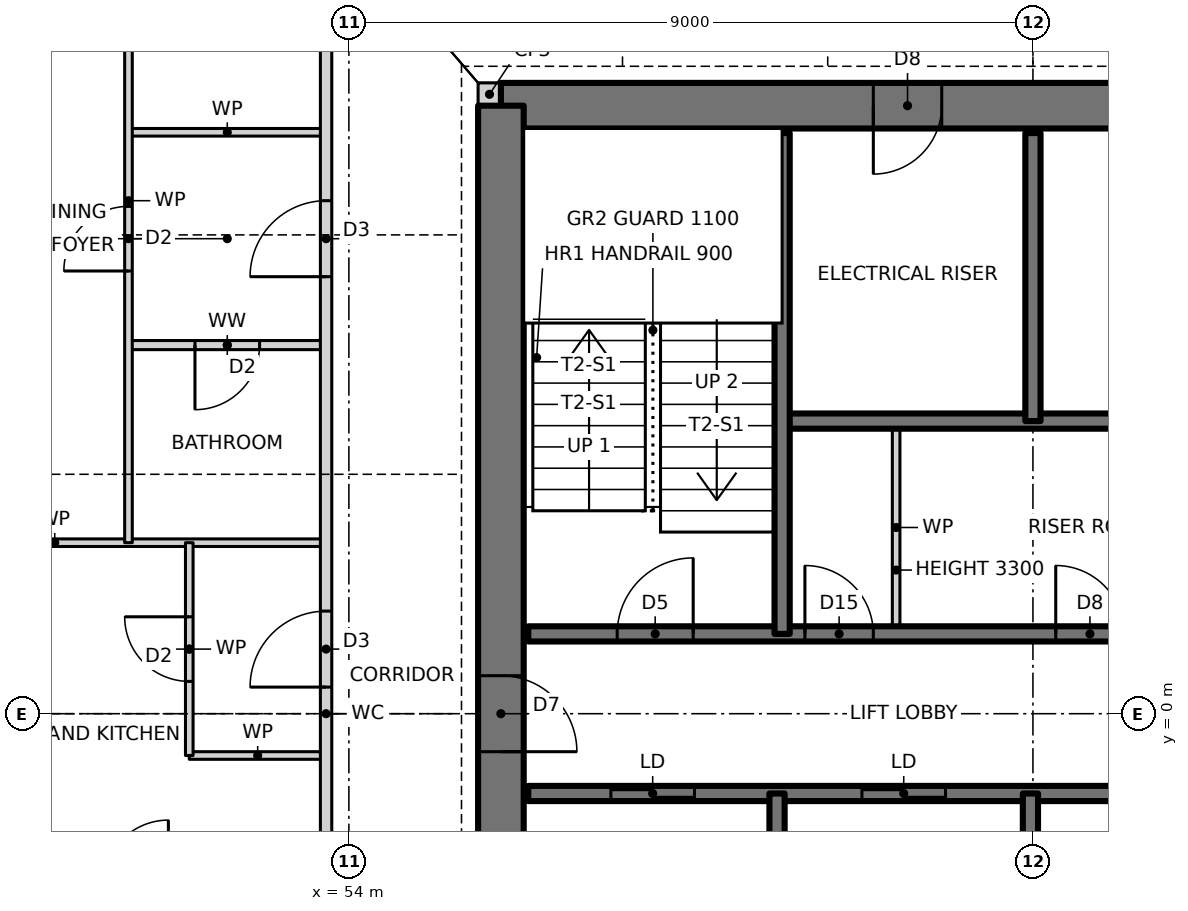
"""IFC4 building model, lengths in metres.
Left out: names, types, materials, properties, quantities, classifications, styles, units other than length and angle.
Written with IfcOpenShell. Run it as: python <this file> out.ifc"""

import sys

from ifc_helpers import new_model, si_unit, direction, frame, frame_2d, origin, place, context, subcontext, project, spatial, rectangle, extrude, element, fill, save


model = new_model("IFC4")
c1 = context("Model", 3, precision=1e-05, world=origin(), true_north=direction((0.0, 1.0)))
c2 = subcontext(c1, "Body", "Model", "MODEL_VIEW")
j1 = project(units=[si_unit("LENGTHUNIT", "METRE"), si_unit("PLANEANGLEUNIT", "RADIAN")], contexts=[c1])
p1 = place(None, origin())
s1 = spatial("IfcSite", under=j1, at=p1, CompositionType="ELEMENT")
p2 = place(p1, origin())
s2 = spatial("IfcBuilding", under=s1, at=p2, CompositionType="ELEMENT")
p3 = place(p2, frame((0.0, 0.0, 71.0)))
s3 = spatial("IfcBuildingStorey", under=s2, at=p3, CompositionType="ELEMENT", Elevation=71.0)
p4 = place(p3, frame((55.7, 8.15, 0.0), z_axis=(0.0, 0.0, 1.0), x_axis=(1.0, 0.0, 0.0)))
e1 = element("IfcWall", 1, at=p4, inside=s3, PredefinedType="SOLIDWALL", context=c2, shape_type="SweptSolid", body=[
    extrude(rectangle(XDim=0.3, YDim=0.3, at=frame_2d((0.15, 0.0))), origin(), (0.0, 0.0, 1.0), 3.5),
])
p5 = place(p3, frame((70.0, 8.0, 0.0), z_axis=(0.0, 0.0, 1.0), x_axis=(-1.0, 0.0, 0.0)))
e2 = element("IfcWall", 2, at=p5, inside=s3, PredefinedType="SHEAR", context=c2, shape_type="SweptSolid", body=[
    extrude(rectangle(XDim=14.0, YDim=0.6, at=frame_2d((7.0, 0.0))), origin(), (0.0, 0.0, 1.0), 3.5),
])
p6 = place(p5, frame((8.2, 0.0, 0.0)))
e3 = element("IfcOpeningElement", 3, at=p6, cuts=e2, PredefinedType="OPENING", context=c2, shape_type="SweptSolid", body=[
    extrude(rectangle(XDim=0.9, YDim=2.1, at=frame_2d((0.45, 1.05))), frame((0.0, 0.31, 0.0), z_axis=(0.0, -1.0, 0.0), x_axis=(1.0, 0.0, 0.0)), (0.0, 0.0, 1.0), 0.62),
])
p7 = place(p5, frame((3.2, 0.0, 0.0)))
e4 = element("IfcOpeningElement", 4, at=p7, cuts=e2, PredefinedType="OPENING", context=c2, shape_type="SweptSolid", body=[
    extrude(rectangle(XDim=0.9, YDim=2.1, at=frame_2d((0.45, 1.05))), frame((0.0, 0.31, 0.0), z_axis=(0.0, -1.0, 0.0), x_axis=(1.0, 0.0, 0.0)), (0.0, 0.0, 1.0), 0.62),
])
p8 = place(p3, frame((56.0, 8.0, 0.0), z_axis=(0.0, 0.0, 1.0), x_axis=(0.0, -1.0, 0.0)))
e5 = element("IfcWall", 5, at=p8, inside=s3, PredefinedType="SHEAR", context=c2, shape_type="SweptSolid", body=[
    extrude(rectangle(XDim=16.0, YDim=0.6, at=frame_2d((8.0, 0.0))), origin(), (0.0, 0.0, 1.0), 3.5),
])
p9 = place(p8, frame((7.5, 0.0, 0.0)))
e6 = element("IfcOpeningElement", 6, at=p9, cuts=e5, PredefinedType="OPENING", context=c2, shape_type="SweptSolid", body=[
    extrude(rectangle(XDim=1.0, YDim=2.1, at=frame_2d((0.5, 1.05))), frame((0.0, 0.31, 0.0), z_axis=(0.0, -1.0, 0.0), x_axis=(1.0, 0.0, 0.0)), (0.0, 0.0, 1.0), 0.62),
])
p10 = place(p3, frame((56.36, -1.05, 0.0), z_axis=(0.0, 0.0, 1.0), x_axis=(1.0, 0.0, 0.0)))
e7 = element("IfcWall", 7, at=p10, inside=s3, PredefinedType="SOLIDWALL", context=c2, shape_type="SweptSolid", body=[
    extrude(rectangle(XDim=13.28, YDim=0.2, at=frame_2d((6.64, 0.0))), origin(), (0.0, 0.0, 1.0), 3.5),
])
p11 = place(p10, frame((11.11, 0.0, 0.0)))
e8 = element("IfcOpeningElement", 8, at=p11, cuts=e7, PredefinedType="OPENING", context=c2, shape_type="SweptSolid", body=[
    extrude(rectangle(XDim=1.0, YDim=2.1, at=frame_2d((0.5, 1.05))), frame((0.0, 0.11, 0.0), z_axis=(0.0, -1.0, 0.0), x_axis=(1.0, 0.0, 0.0)), (0.0, 0.0, 1.0), 0.22),
])
p12 = place(p10, frame((1.087, 0.0, 0.0)))
e9 = element("IfcOpeningElement", 9, at=p12, cuts=e7, PredefinedType="OPENING", context=c2, shape_type="SweptSolid", body=[
    extrude(rectangle(XDim=1.1, YDim=2.1, at=frame_2d((0.55, 1.05))), frame((0.0, 0.11, 0.0), z_axis=(0.0, -1.0, 0.0), x_axis=(1.0, 0.0, 0.0)), (0.0, 0.0, 1.0), 0.22),
])
p13 = place(p10, frame((4.39, 0.0, 0.0)))
e10 = element("IfcOpeningElement", 10, at=p13, cuts=e7, PredefinedType="OPENING", context=c2, shape_type="SweptSolid", body=[
    extrude(rectangle(XDim=1.1, YDim=2.1, at=frame_2d((0.55, 1.05))), frame((0.0, 0.11, 0.0), z_axis=(0.0, -1.0, 0.0), x_axis=(1.0, 0.0, 0.0)), (0.0, 0.0, 1.0), 0.22),
])
p14 = place(p10, frame((7.724, 0.0, 0.0)))
e11 = element("IfcOpeningElement", 11, at=p14, cuts=e7, PredefinedType="OPENING", context=c2, shape_type="SweptSolid", body=[
    extrude(rectangle(XDim=1.1, YDim=2.1, at=frame_2d((0.55, 1.05))), frame((0.0, 0.11, 0.0), z_axis=(0.0, -1.0, 0.0), x_axis=(1.0, 0.0, 0.0)), (0.0, 0.0, 1.0), 0.22),
])
p15 = place(p3, frame((51.9, -0.55, 0.0), z_axis=(0.0, 0.0, 1.0), x_axis=(1.0, 0.0, 0.0)))
e12 = element("IfcWall", 12, at=p15, inside=s3, PredefinedType="PARTITIONING", context=c2, shape_type="SweptSolid", body=[
    extrude(rectangle(XDim=1.8, YDim=0.1, at=frame_2d((0.9, 0.0))), origin(), (0.0, 0.0, 1.0), 3.2),
])
p16 = place(p3, frame((56.36, 1.05, 0.0), z_axis=(0.0, 0.0, 1.0), x_axis=(1.0, 0.0, 0.0)))
e13 = element("IfcWall", 13, at=p16, inside=s3, PredefinedType="SOLIDWALL", context=c2, shape_type="SweptSolid", body=[
    extrude(rectangle(XDim=13.28, YDim=0.2, at=frame_2d((6.64, 0.0))), origin(), (0.0, 0.0, 1.0), 3.5),
])
p17 = place(p16, frame((1.17, 0.0, 0.0)))
e14 = element("IfcOpeningElement", 14, at=p17, cuts=e13, PredefinedType="OPENING", context=c2, shape_type="SweptSolid", body=[
    extrude(rectangle(XDim=1.0, YDim=2.1, at=frame_2d((0.5, 1.05))), frame((0.0, 0.11, 0.0), z_axis=(0.0, -1.0, 0.0), x_axis=(1.0, 0.0, 0.0)), (0.0, 0.0, 1.0), 0.22),
])
p18 = place(p16, frame((6.94, 0.0, 0.0)))
e15 = element("IfcOpeningElement", 15, at=p18, cuts=e13, PredefinedType="OPENING", context=c2, shape_type="SweptSolid", body=[
    extrude(rectangle(XDim=0.9, YDim=2.1, at=frame_2d((0.45, 1.05))), frame((0.0, 0.11, 0.0), z_axis=(0.0, -1.0, 0.0), x_axis=(1.0, 0.0, 0.0)), (0.0, 0.0, 1.0), 0.22),
])
p19 = place(p16, frame((3.64, 0.0, 0.0)))
e16 = element("IfcOpeningElement", 16, at=p19, cuts=e13, PredefinedType="OPENING", context=c2, shape_type="SweptSolid", body=[
    extrude(rectangle(XDim=0.9, YDim=2.1, at=frame_2d((0.45, 1.05))), frame((0.0, 0.11, 0.0), z_axis=(0.0, -1.0, 0.0), x_axis=(1.0, 0.0, 0.0)), (0.0, 0.0, 1.0), 0.22),
])
p20 = place(p16, frame((10.96, 0.0, 0.0)))
e17 = element("IfcOpeningElement", 17, at=p20, cuts=e13, PredefinedType="OPENING", context=c2, shape_type="SweptSolid", body=[
    extrude(rectangle(XDim=1.3, YDim=2.1, at=frame_2d((0.65, 1.05))), frame((0.0, 0.11, 0.0), z_axis=(0.0, -1.0, 0.0), x_axis=(1.0, 0.0, 0.0)), (0.0, 0.0, 1.0), 0.22),
])
p21 = place(p3, frame((46.56, 2.25, 0.0), z_axis=(0.0, 0.0, 1.0), x_axis=(1.0, 0.0, 0.0)))
e18 = element("IfcWall", 18, at=p21, inside=s3, PredefinedType="PARTITIONING", context=c2, shape_type="SweptSolid", body=[
    extrude(rectangle(XDim=7.14, YDim=0.1, at=frame_2d((3.57, 0.0))), origin(), (0.0, 0.0, 1.0), 3.2),
])
p22 = place(p3, frame((59.7, 3.85, 0.0), z_axis=(0.0, 0.0, 1.0), x_axis=(1.0, 0.0, 0.0)))
e19 = element("IfcWall", 19, at=p22, inside=s3, PredefinedType="SOLIDWALL", context=c2, shape_type="SweptSolid", body=[
    extrude(rectangle(XDim=9.94, YDim=0.2, at=frame_2d((4.97, 0.0))), origin(), (0.0, 0.0, 1.0), 3.5),
])
p23 = place(p3, frame((51.1, 4.85, 0.0), z_axis=(0.0, 0.0, 1.0), x_axis=(1.0, 0.0, 0.0)))
e20 = element("IfcWall", 20, at=p23, inside=s3, PredefinedType="PARTITIONING", context=c2, shape_type="SweptSolid", body=[
    extrude(rectangle(XDim=2.6, YDim=0.12, at=frame_2d((1.3, 0.0))), origin(), (0.0, 0.0, 1.0), 3.2),
])
p24 = place(p23, frame((0.875, 0.0, 0.0)))
e21 = element("IfcOpeningElement", 21, at=p24, cuts=e20, PredefinedType="OPENING", context=c2, shape_type="SweptSolid", body=[
    extrude(rectangle(XDim=0.85, YDim=2.1, at=frame_2d((0.425, 1.05))), frame((0.0, 0.07, 0.0), z_axis=(0.0, -1.0, 0.0), x_axis=(1.0, 0.0, 0.0)), (0.0, 0.0, 1.0), 0.14),
])
p25 = place(p3, frame((51.1, 7.65, 0.0), z_axis=(0.0, 0.0, 1.0), x_axis=(1.0, 0.0, 0.0)))
e22 = element("IfcWall", 22, at=p25, inside=s3, PredefinedType="PARTITIONING", context=c2, shape_type="SweptSolid", body=[
    extrude(rectangle(XDim=2.6, YDim=0.1, at=frame_2d((1.3, 0.0))), origin(), (0.0, 0.0, 1.0), 3.2),
])
p26 = place(p3, frame((63.0, 3.85, 0.0), z_axis=(0.0, 0.0, 1.0), x_axis=(0.0, 1.0, 0.0)))
e23 = element("IfcWall", 23, at=p26, inside=s3, PredefinedType="SOLIDWALL", context=c2, shape_type="SweptSolid", body=[
    extrude(rectangle(XDim=3.79, YDim=0.2, at=frame_2d((1.895, 0.0))), origin(), (0.0, 0.0, 1.0), 3.5),
])
p27 = place(p3, frame((62.967, -3.85, 0.0), z_axis=(0.0, 0.0, 1.0), x_axis=(0.0, 1.0, 0.0)))
e24 = element("IfcWall", 24, at=p27, inside=s3, PredefinedType="SOLIDWALL", context=c2, shape_type="SweptSolid", body=[
    extrude(rectangle(XDim=2.8, YDim=0.2, at=frame_2d((1.4, 0.0))), origin(), (0.0, 0.0, 1.0), 3.5),
])
p28 = place(p3, frame((61.2, 1.05, 0.0), z_axis=(0.0, 0.0, 1.0), x_axis=(0.0, 1.0, 0.0)))
e25 = element("IfcWall", 25, at=p28, inside=s3, PredefinedType="PARTITIONING", context=c2, shape_type="SweptSolid", body=[
    extrude(rectangle(XDim=2.8, YDim=0.1, at=frame_2d((1.4, 0.0))), origin(), (0.0, 0.0, 1.0), 3.3),
])
p29 = place(p3, frame((59.7, 1.05, 0.0), z_axis=(0.0, 0.0, 1.0), x_axis=(0.0, 1.0, 0.0)))
e26 = element("IfcWall", 26, at=p29, inside=s3, PredefinedType="SOLIDWALL", context=c2, shape_type="SweptSolid", body=[
    extrude(rectangle(XDim=6.59, YDim=0.2, at=frame_2d((3.295, 0.0))), origin(), (0.0, 0.0, 1.0), 3.5),
])
p30 = place(p3, frame((59.633, -3.85, 0.0), z_axis=(0.0, 0.0, 1.0), x_axis=(0.0, 1.0, 0.0)))
e27 = element("IfcWall", 27, at=p30, inside=s3, PredefinedType="SOLIDWALL", context=c2, shape_type="SweptSolid", body=[
    extrude(rectangle(XDim=2.8, YDim=0.2, at=frame_2d((1.4, 0.0))), origin(), (0.0, 0.0, 1.0), 3.5),
])
p31 = place(p3, frame((53.7, -10.568, 0.0), z_axis=(0.0, 0.0, 1.0), x_axis=(0.0, 1.0, 0.0)))
e28 = element("IfcWall", 28, at=p31, inside=s3, PredefinedType="PARTITIONING", context=c2, shape_type="SweptSolid", body=[
    extrude(rectangle(XDim=21.136, YDim=0.15, at=frame_2d((10.568, 0.0))), origin(), (0.0, 0.0, 1.0), 3.2),
])
p32 = place(p31, frame((16.318, 0.0, 0.0)))
e29 = element("IfcOpeningElement", 29, at=p32, cuts=e28, PredefinedType="OPENING", context=c2, shape_type="SweptSolid", body=[
    extrude(rectangle(XDim=1.0, YDim=2.1, at=frame_2d((0.5, 1.05))), frame((0.0, 0.085, 0.0), z_axis=(0.0, -1.0, 0.0), x_axis=(1.0, 0.0, 0.0)), (0.0, 0.0, 1.0), 0.17),
])
p33 = place(p31, frame((10.918, 0.0, 0.0)))
e30 = element("IfcOpeningElement", 30, at=p33, cuts=e28, PredefinedType="OPENING", context=c2, shape_type="SweptSolid", body=[
    extrude(rectangle(XDim=1.0, YDim=2.1, at=frame_2d((0.5, 1.05))), frame((0.0, 0.085, 0.0), z_axis=(0.0, -1.0, 0.0), x_axis=(1.0, 0.0, 0.0)), (0.0, 0.0, 1.0), 0.17),
])
p34 = place(p3, frame((51.9, -0.55, 0.0), z_axis=(0.0, 0.0, 1.0), x_axis=(0.0, 1.0, 0.0)))
e31 = element("IfcWall", 31, at=p34, inside=s3, PredefinedType="PARTITIONING", context=c2, shape_type="SweptSolid", body=[
    extrude(rectangle(XDim=2.8, YDim=0.1, at=frame_2d((1.4, 0.0))), origin(), (0.0, 0.0, 1.0), 3.2),
])
p35 = place(p34, frame((0.975, 0.0, 0.0)))
e32 = element("IfcOpeningElement", 32, at=p35, cuts=e31, PredefinedType="OPENING", context=c2, shape_type="SweptSolid", body=[
    extrude(rectangle(XDim=0.85, YDim=2.1, at=frame_2d((0.425, 1.05))), frame((0.0, 0.06, 0.0), z_axis=(0.0, -1.0, 0.0), x_axis=(1.0, 0.0, 0.0)), (0.0, 0.0, 1.0), 0.12),
])
p36 = place(p3, frame((51.1, 2.25, 0.0), z_axis=(0.0, 0.0, 1.0), x_axis=(0.0, 1.0, 0.0)))
e33 = element("IfcWall", 33, at=p36, inside=s3, PredefinedType="PARTITIONING", context=c2, shape_type="SweptSolid", body=[
    extrude(rectangle(XDim=9.0, YDim=0.1, at=frame_2d((4.5, 0.0))), origin(), (0.0, 0.0, 1.0), 3.2),
])
p37 = place(p36, frame((6.775, 0.0, 0.0)))
e34 = element("IfcOpeningElement", 34, at=p37, cuts=e33, PredefinedType="OPENING", context=c2, shape_type="SweptSolid", body=[
    extrude(rectangle(XDim=0.85, YDim=2.1, at=frame_2d((0.425, 1.05))), frame((0.0, 0.06, 0.0), z_axis=(0.0, -1.0, 0.0), x_axis=(1.0, 0.0, 0.0)), (0.0, 0.0, 1.0), 0.12),
])
p38 = place(p36, frame((3.575, 0.0, 0.0)))
e35 = element("IfcOpeningElement", 35, at=p38, cuts=e33, PredefinedType="OPENING", context=c2, shape_type="SweptSolid", body=[
    extrude(rectangle(XDim=0.85, YDim=2.1, at=frame_2d((0.425, 1.05))), frame((0.0, 0.06, 0.0), z_axis=(0.0, -1.0, 0.0), x_axis=(1.0, 0.0, 0.0)), (0.0, 0.0, 1.0), 0.12),
])
p39 = place(p17, origin())
e36 = element("IfcDoor", 36, at=p39, inside=s3, OperationType="SINGLE_SWING_RIGHT", PredefinedType="DOOR", context=c2, shape_type="SweptSolid", body=[
    extrude(rectangle(XDim=1.0, YDim=2.1, at=frame_2d((0.5, 1.05))), frame((0.0, 0.025, 0.0), z_axis=(0.0, -1.0, 0.0), x_axis=(1.0, 0.0, 0.0)), (0.0, 0.0, 1.0), 0.05),
])
fill(e14, e36)
p40 = place(p18, origin())
e37 = element("IfcDoor", 37, at=p40, inside=s3, OperationType="SINGLE_SWING_LEFT", PredefinedType="DOOR", context=c2, shape_type="SweptSolid", body=[
    extrude(rectangle(XDim=0.9, YDim=2.1, at=frame_2d((0.45, 1.05))), frame((0.0, 0.025, 0.0), z_axis=(0.0, -1.0, 0.0), x_axis=(1.0, 0.0, 0.0)), (0.0, 0.0, 1.0), 0.05),
])
fill(e15, e37)
p41 = place(p19, origin())
e38 = element("IfcDoor", 38, at=p41, inside=s3, OperationType="SINGLE_SWING_LEFT", PredefinedType="DOOR", context=c2, shape_type="SweptSolid", body=[
    extrude(rectangle(XDim=0.9, YDim=2.1, at=frame_2d((0.45, 1.05))), frame((0.0, 0.025, 0.0), z_axis=(0.0, -1.0, 0.0), x_axis=(1.0, 0.0, 0.0)), (0.0, 0.0, 1.0), 0.05),
])
fill(e16, e38)
p42 = place(p32, origin())
e39 = element("IfcDoor", 39, at=p42, inside=s3, OperationType="SINGLE_SWING_LEFT", PredefinedType="DOOR", context=c2, shape_type="SweptSolid", body=[
    extrude(rectangle(XDim=1.0, YDim=2.1, at=frame_2d((0.5, 1.05))), frame((0.0, 0.025, 0.0), z_axis=(0.0, -1.0, 0.0), x_axis=(1.0, 0.0, 0.0)), (0.0, 0.0, 1.0), 0.05),
])
fill(e29, e39)
p43 = place(p38, origin())
e40 = element("IfcDoor", 40, at=p43, inside=s3, OperationType="SINGLE_SWING_LEFT", PredefinedType="DOOR", context=c2, shape_type="SweptSolid", body=[
    extrude(rectangle(XDim=0.85, YDim=2.1, at=frame_2d((0.425, 1.05))), frame((0.0, 0.025, 0.0), z_axis=(0.0, -1.0, 0.0), x_axis=(1.0, 0.0, 0.0)), (0.0, 0.0, 1.0), 0.05),
])
fill(e35, e40)
p44 = place(p24, frame((0.85, 0.0, 0.0), z_axis=(0.0, 0.0, 1.0), x_axis=(-1.0, 0.0, 0.0)))
e41 = element("IfcDoor", 41, at=p44, inside=s3, OperationType="SINGLE_SWING_RIGHT", PredefinedType="DOOR", context=c2, shape_type="SweptSolid", body=[
    extrude(rectangle(XDim=0.85, YDim=2.1, at=frame_2d((0.425, 1.05))), frame((0.0, 0.025, 0.0), z_axis=(0.0, -1.0, 0.0), x_axis=(1.0, 0.0, 0.0)), (0.0, 0.0, 1.0), 0.05),
])
fill(e21, e41)
p45 = place(p33, origin())
e42 = element("IfcDoor", 42, at=p45, inside=s3, OperationType="SINGLE_SWING_LEFT", PredefinedType="DOOR", context=c2, shape_type="SweptSolid", body=[
    extrude(rectangle(XDim=1.0, YDim=2.1, at=frame_2d((0.5, 1.05))), frame((0.0, 0.025, 0.0), z_axis=(0.0, -1.0, 0.0), x_axis=(1.0, 0.0, 0.0)), (0.0, 0.0, 1.0), 0.05),
])
fill(e30, e42)
p46 = place(p35, origin())
e43 = element("IfcDoor", 43, at=p46, inside=s3, OperationType="SINGLE_SWING_RIGHT", PredefinedType="DOOR", context=c2, shape_type="SweptSolid", body=[
    extrude(rectangle(XDim=0.85, YDim=2.1, at=frame_2d((0.425, 1.05))), frame((0.0, 0.025, 0.0), z_axis=(0.0, -1.0, 0.0), x_axis=(1.0, 0.0, 0.0)), (0.0, 0.0, 1.0), 0.05),
])
fill(e32, e43)
p47 = place(p9, origin())
e44 = element("IfcDoor", 44, at=p47, inside=s3, OperationType="SINGLE_SWING_RIGHT", PredefinedType="DOOR", context=c2, shape_type="SweptSolid", body=[
    extrude(rectangle(XDim=1.0, YDim=2.1, at=frame_2d((0.5, 1.05))), frame((0.0, 0.025, 0.0), z_axis=(0.0, -1.0, 0.0), x_axis=(1.0, 0.0, 0.0)), (0.0, 0.0, 1.0), 0.05),
])
fill(e6, e44)
p48 = place(p6, origin())
e45 = element("IfcDoor", 45, at=p48, inside=s3, OperationType="SINGLE_SWING_RIGHT", PredefinedType="DOOR", context=c2, shape_type="SweptSolid", body=[
    extrude(rectangle(XDim=0.9, YDim=2.1, at=frame_2d((0.45, 1.05))), frame((0.0, 0.025, 0.0), z_axis=(0.0, -1.0, 0.0), x_axis=(1.0, 0.0, 0.0)), (0.0, 0.0, 1.0), 0.05),
])
fill(e3, e45)
p49 = place(p12, origin())
e46 = element("IfcDoor", 46, at=p49, inside=s3, OperationType="DOUBLE_DOOR_SLIDING", PredefinedType="DOOR", context=c2, shape_type="SweptSolid", body=[
    extrude(rectangle(XDim=1.1, YDim=2.1, at=frame_2d((0.55, 1.05))), frame((0.0, 0.025, 0.0), z_axis=(0.0, -1.0, 0.0), x_axis=(1.0, 0.0, 0.0)), (0.0, 0.0, 1.0), 0.05),
])
fill(e9, e46)
p50 = place(p13, origin())
e47 = element("IfcDoor", 47, at=p50, inside=s3, OperationType="DOUBLE_DOOR_SLIDING", PredefinedType="DOOR", context=c2, shape_type="SweptSolid", body=[
    extrude(rectangle(XDim=1.1, YDim=2.1, at=frame_2d((0.55, 1.05))), frame((0.0, 0.025, 0.0), z_axis=(0.0, -1.0, 0.0), x_axis=(1.0, 0.0, 0.0)), (0.0, 0.0, 1.0), 0.05),
])
fill(e10, e47)
save(model, sys.argv[1])
